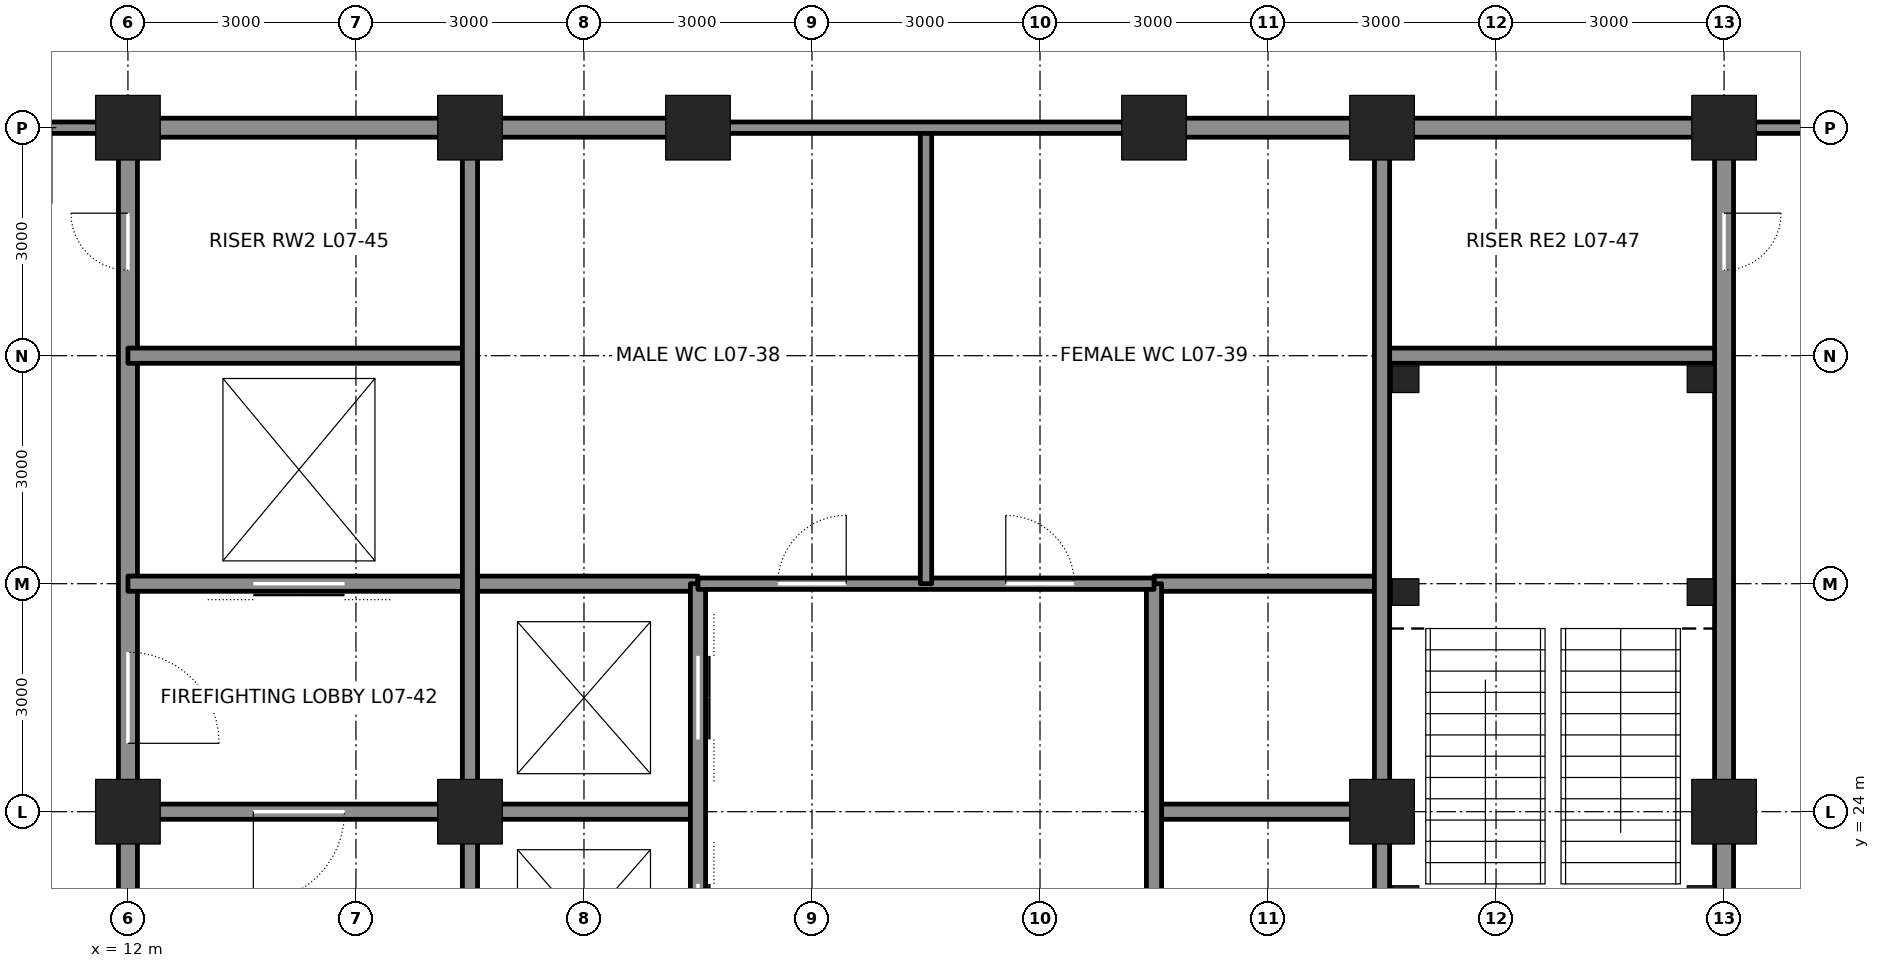
"""IFC4 building model, lengths in metres.
Left out: names, types, materials, properties, quantities, classifications, styles, units other than length and angle.
Written with IfcOpenShell. Run it as: python <this file> out.ifc"""

import sys

from ifc_helpers import new_model, si_unit, direction, frame, frame_2d, origin, origin_2d, place, context, subcontext, project, spatial, rectangle, hollow_rectangle, extrude, element, fill, save


model = new_model("IFC4")
c1 = context("Model", 3, precision=1e-05, world=origin(), true_north=direction((0.0, 1.0)))
c2 = subcontext(c1, "Body", "Model", "MODEL_VIEW")
j1 = project(units=[si_unit("LENGTHUNIT", "METRE"), si_unit("PLANEANGLEUNIT", "RADIAN")], contexts=[c1])
p1 = place(None, origin())
s1 = spatial("IfcSite", under=j1, at=p1, CompositionType="ELEMENT")
p2 = place(p1, origin())
s2 = spatial("IfcBuilding", under=s1, at=p2, CompositionType="ELEMENT")
p3 = place(p2, frame((0.0, 0.0, 37.8)))
s3 = spatial("IfcBuildingStorey", under=s2, at=p3, CompositionType="ELEMENT", Elevation=37.8)
for number, where, z_axis, x_axis in (
    (1, (12.0, 33.0, 0.0), (0.0, 0.0, 1.0), (1.0, 0.0, 0.0)),
    (2, (16.5, 33.0, 0.0), (0.0, 0.0, 1.0), (1.0, 0.0, 0.0)),
    (3, (19.5, 33.0, 0.0), (0.0, 0.0, 1.0), (1.0, 0.0, 0.0)),
    (4, (25.5, 33.0, 0.0), (0.0, 0.0, 1.0), (1.0, 0.0, 0.0)),
    (5, (28.5, 33.0, 0.0), (0.0, 0.0, 1.0), (1.0, 0.0, 0.0)),
    (6, (33.0, 33.0, 0.0), (0.0, 0.0, 1.0), (1.0, 0.0, 0.0)),
    (7, (12.0, 24.0, 0.0), (0.0, 0.0, 1.0), (1.0, 0.0, 0.0)),
    (8, (33.0, 24.0, 0.0), (0.0, 0.0, 1.0), (1.0, 0.0, 0.0)),
    (9, (16.5, 24.0, 0.0), (0.0, 0.0, 1.0), (1.0, 0.0, 0.0)),
    (10, (28.5, 24.0, 0.0), (0.0, 0.0, 1.0), (1.0, 0.0, 0.0)),
):
    element("IfcColumn", number, at=place(p3, frame(where, z_axis=z_axis, x_axis=x_axis)), inside=s3, PredefinedType="COLUMN", context=c2, shape_type="SweptSolid", body=[
        extrude(hollow_rectangle(XDim=0.85, YDim=0.85, WallThickness=0.085, at=origin_2d()), origin(), (0.0, 0.0, 1.0), 4.5),
    ])
p4 = place(p3, frame((12.0, 21.25, 0.0), z_axis=(0.0, 0.0, 1.0), x_axis=(0.0, 1.0, 0.0)))
e11 = element("IfcWall", 11, at=p4, inside=s3, PredefinedType="SOLIDWALL", context=c2, shape_type="SweptSolid", body=[
    extrude(rectangle(XDim=2.5, YDim=0.25, at=frame_2d((1.25, 0.0))), origin(), (0.0, 0.0, 1.0), 3.113),
])
p5 = place(p3, frame((12.0, 24.25, 0.0), z_axis=(0.0, 0.0, 1.0), x_axis=(0.0, 1.0, 0.0)))
e12 = element("IfcWall", 12, at=p5, inside=s3, PredefinedType="SOLIDWALL", context=c2, shape_type="SweptSolid", body=[
    extrude(rectangle(XDim=8.5, YDim=0.25, at=frame_2d((4.25, 0.0))), origin(), (0.0, 0.0, 1.0), 3.113),
])
p6 = place(p5, frame((0.65, 0.0, 0.0)))
e13 = element("IfcOpeningElement", 13, at=p6, cuts=e12, PredefinedType="OPENING", context=c2, shape_type="SweptSolid", body=[
    extrude(rectangle(XDim=1.2, YDim=2.1, at=frame_2d((0.6, 1.05))), frame((0.0, 0.135, 0.0), z_axis=(0.0, -1.0, 0.0), x_axis=(1.0, 0.0, 0.0)), (0.0, 0.0, 1.0), 0.27),
])
p7 = place(p5, frame((6.875, 0.0, 0.0)))
e14 = element("IfcOpeningElement", 14, at=p7, cuts=e12, PredefinedType="OPENING", context=c2, shape_type="SweptSolid", body=[
    extrude(rectangle(XDim=0.75, YDim=2.1, at=frame_2d((0.375, 1.05))), frame((0.0, 0.135, 0.0), z_axis=(0.0, -1.0, 0.0), x_axis=(1.0, 0.0, 0.0)), (0.0, 0.0, 1.0), 0.27),
])
p8 = place(p3, frame((12.25, 24.0, 0.0), z_axis=(0.0, 0.0, 1.0), x_axis=(1.0, 0.0, 0.0)))
e15 = element("IfcWall", 15, at=p8, inside=s3, PredefinedType="SOLIDWALL", context=c2, shape_type="SweptSolid", body=[
    extrude(rectangle(XDim=4.0, YDim=0.2, at=frame_2d((2.0, 0.0))), origin(), (0.0, 0.0, 1.0), 3.39),
])
p9 = place(p8, frame((1.4, 0.0, 0.0)))
e16 = element("IfcOpeningElement", 16, at=p9, cuts=e15, PredefinedType="OPENING", context=c2, shape_type="SweptSolid", body=[
    extrude(rectangle(XDim=1.2, YDim=2.1, at=frame_2d((0.6, 1.05))), frame((0.0, 0.11, 0.0), z_axis=(0.0, -1.0, 0.0), x_axis=(1.0, 0.0, 0.0)), (0.0, 0.0, 1.0), 0.22),
])
for number, where, z_axis, x_axis in (
    (17, (16.75, 24.0, 0.0), (0.0, 0.0, 1.0), (1.0, 0.0, 0.0)),
    (18, (25.5, 24.0, 0.0), (0.0, 0.0, 1.0), (1.0, 0.0, 0.0)),
):
    element("IfcWall", number, at=place(p3, frame(where, z_axis=z_axis, x_axis=x_axis)), inside=s3, PredefinedType="SOLIDWALL", context=c2, shape_type="SweptSolid", body=[
        extrude(rectangle(XDim=2.75, YDim=0.2, at=frame_2d((1.375, 0.0))), origin(), (0.0, 0.0, 1.0), 3.39),
    ])
p10 = place(p3, frame((12.0, 27.0, 0.0), z_axis=(0.0, 0.0, 1.0), x_axis=(1.0, 0.0, 0.0)))
e19 = element("IfcWall", 19, at=p10, inside=s3, PredefinedType="SOLIDWALL", context=c2, shape_type="SweptSolid", body=[
    extrude(rectangle(XDim=7.5, YDim=0.2, at=frame_2d((3.75, 0.0))), origin(), (0.0, 0.0, 1.0), 4.34),
])
p11 = place(p10, frame((1.65, 0.0, 0.0)))
e20 = element("IfcOpeningElement", 20, at=p11, cuts=e19, PredefinedType="OPENING", context=c2, shape_type="SweptSolid", body=[
    extrude(rectangle(XDim=1.2, YDim=2.1, at=frame_2d((0.6, 1.05))), frame((0.0, 0.11, 0.0), z_axis=(0.0, -1.0, 0.0), x_axis=(1.0, 0.0, 0.0)), (0.0, 0.0, 1.0), 0.22),
])
p12 = place(p3, frame((25.5, 27.0, 0.0), z_axis=(0.0, 0.0, 1.0), x_axis=(1.0, 0.0, 0.0)))
e21 = element("IfcWall", 21, at=p12, inside=s3, PredefinedType="SOLIDWALL", context=c2, shape_type="SweptSolid", body=[
    extrude(rectangle(XDim=3.0, YDim=0.2, at=frame_2d((1.5, 0.0))), origin(), (0.0, 0.0, 1.0), 4.34),
])
for number, where, z_axis, x_axis in (
    (22, (12.0, 30.0, 0.0), (0.0, 0.0, 1.0), (1.0, 0.0, 0.0)),
    (23, (28.5, 30.0, 0.0), (0.0, 0.0, 1.0), (1.0, 0.0, 0.0)),
):
    element("IfcWall", number, at=place(p3, frame(where, z_axis=z_axis, x_axis=x_axis)), inside=s3, PredefinedType="SOLIDWALL", context=c2, shape_type="SweptSolid", body=[
        extrude(rectangle(XDim=4.5, YDim=0.2, at=frame_2d((2.25, 0.0))), origin(), (0.0, 0.0, 1.0), 4.34),
    ])
p13 = place(p3, frame((12.25, 33.0, 0.0), z_axis=(0.0, 0.0, 1.0), x_axis=(1.0, 0.0, 0.0)))
e24 = element("IfcWall", 24, at=p13, inside=s3, PredefinedType="SOLIDWALL", context=c2, shape_type="SweptSolid", body=[
    extrude(rectangle(XDim=4.0, YDim=0.25, at=frame_2d((2.0, 0.0))), origin(), (0.0, 0.0, 1.0), 3.181),
])
for number, where, z_axis, x_axis in (
    (25, (16.75, 33.0, 0.0), (0.0, 0.0, 1.0), (1.0, 0.0, 0.0)),
    (26, (25.75, 33.0, 0.0), (0.0, 0.0, 1.0), (1.0, 0.0, 0.0)),
):
    element("IfcWall", number, at=place(p3, frame(where, z_axis=z_axis, x_axis=x_axis)), inside=s3, PredefinedType="SOLIDWALL", context=c2, shape_type="SweptSolid", body=[
        extrude(rectangle(XDim=2.5, YDim=0.25, at=frame_2d((1.25, 0.0))), origin(), (0.0, 0.0, 1.0), 3.181),
    ])
p14 = place(p3, frame((28.75, 33.0, 0.0), z_axis=(0.0, 0.0, 1.0), x_axis=(1.0, 0.0, 0.0)))
e27 = element("IfcWall", 27, at=p14, inside=s3, PredefinedType="SOLIDWALL", context=c2, shape_type="SweptSolid", body=[
    extrude(rectangle(XDim=4.0, YDim=0.25, at=frame_2d((2.0, 0.0))), origin(), (0.0, 0.0, 1.0), 3.181),
])
p15 = place(p3, frame((16.5, 21.25, 0.0), z_axis=(0.0, 0.0, 1.0), x_axis=(0.0, 1.0, 0.0)))
e28 = element("IfcWall", 28, at=p15, inside=s3, PredefinedType="SOLIDWALL", context=c2, shape_type="SweptSolid", body=[
    extrude(rectangle(XDim=2.5, YDim=0.2, at=frame_2d((1.25, 0.0))), origin(), (0.0, 0.0, 1.0), 3.413),
])
p16 = place(p3, frame((16.5, 24.25, 0.0), z_axis=(0.0, 0.0, 1.0), x_axis=(0.0, 1.0, 0.0)))
e29 = element("IfcWall", 29, at=p16, inside=s3, PredefinedType="SOLIDWALL", context=c2, shape_type="SweptSolid", body=[
    extrude(rectangle(XDim=8.5, YDim=0.2, at=frame_2d((4.25, 0.0))), origin(), (0.0, 0.0, 1.0), 3.413),
])
p17 = place(p3, frame((19.5, 15.0, 0.0), z_axis=(0.0, 0.0, 1.0), x_axis=(0.0, 1.0, 0.0)))
e30 = element("IfcWall", 30, at=p17, inside=s3, PredefinedType="SOLIDWALL", context=c2, shape_type="SweptSolid", body=[
    extrude(rectangle(XDim=12.0, YDim=0.2, at=frame_2d((6.0, 0.0))), origin(), (0.0, 0.0, 1.0), 3.365),
])
p18 = place(p17, frame((0.95, 0.0, 0.0)))
e31 = element("IfcOpeningElement", 31, at=p18, cuts=e30, PredefinedType="OPENING", context=c2, shape_type="SweptSolid", body=[
    extrude(rectangle(XDim=1.1, YDim=2.1, at=frame_2d((0.55, 1.05))), frame((0.0, 0.11, 0.0), z_axis=(0.0, -1.0, 0.0), x_axis=(1.0, 0.0, 0.0)), (0.0, 0.0, 1.0), 0.22),
])
p19 = place(p17, frame((3.95, 0.0, 0.0)))
e32 = element("IfcOpeningElement", 32, at=p19, cuts=e30, PredefinedType="OPENING", context=c2, shape_type="SweptSolid", body=[
    extrude(rectangle(XDim=1.1, YDim=2.1, at=frame_2d((0.55, 1.05))), frame((0.0, 0.11, 0.0), z_axis=(0.0, -1.0, 0.0), x_axis=(1.0, 0.0, 0.0)), (0.0, 0.0, 1.0), 0.22),
])
p20 = place(p17, frame((6.95, 0.0, 0.0)))
e33 = element("IfcOpeningElement", 33, at=p20, cuts=e30, PredefinedType="OPENING", context=c2, shape_type="SweptSolid", body=[
    extrude(rectangle(XDim=1.1, YDim=2.1, at=frame_2d((0.55, 1.05))), frame((0.0, 0.11, 0.0), z_axis=(0.0, -1.0, 0.0), x_axis=(1.0, 0.0, 0.0)), (0.0, 0.0, 1.0), 0.22),
])
p21 = place(p17, frame((9.95, 0.0, 0.0)))
e34 = element("IfcOpeningElement", 34, at=p21, cuts=e30, PredefinedType="OPENING", context=c2, shape_type="SweptSolid", body=[
    extrude(rectangle(XDim=1.1, YDim=2.1, at=frame_2d((0.55, 1.05))), frame((0.0, 0.11, 0.0), z_axis=(0.0, -1.0, 0.0), x_axis=(1.0, 0.0, 0.0)), (0.0, 0.0, 1.0), 0.22),
])
p22 = place(p3, frame((25.5, 15.0, 0.0), z_axis=(0.0, 0.0, 1.0), x_axis=(0.0, 1.0, 0.0)))
e35 = element("IfcWall", 35, at=p22, inside=s3, PredefinedType="SOLIDWALL", context=c2, shape_type="SweptSolid", body=[
    extrude(rectangle(XDim=12.0, YDim=0.2, at=frame_2d((6.0, 0.0))), origin(), (0.0, 0.0, 1.0), 3.365),
])
p23 = place(p3, frame((28.5, 21.25, 0.0), z_axis=(0.0, 0.0, 1.0), x_axis=(0.0, 1.0, 0.0)))
e36 = element("IfcWall", 36, at=p23, inside=s3, PredefinedType="SOLIDWALL", context=c2, shape_type="SweptSolid", body=[
    extrude(rectangle(XDim=2.5, YDim=0.2, at=frame_2d((1.25, 0.0))), origin(), (0.0, 0.0, 1.0), 3.413),
])
p24 = place(p3, frame((28.5, 24.25, 0.0), z_axis=(0.0, 0.0, 1.0), x_axis=(0.0, 1.0, 0.0)))
e37 = element("IfcWall", 37, at=p24, inside=s3, PredefinedType="SOLIDWALL", context=c2, shape_type="SweptSolid", body=[
    extrude(rectangle(XDim=8.5, YDim=0.2, at=frame_2d((4.25, 0.0))), origin(), (0.0, 0.0, 1.0), 3.413),
])
p25 = place(p3, frame((33.0, 21.25, 0.0), z_axis=(0.0, 0.0, 1.0), x_axis=(0.0, 1.0, 0.0)))
e38 = element("IfcWall", 38, at=p25, inside=s3, PredefinedType="SOLIDWALL", context=c2, shape_type="SweptSolid", body=[
    extrude(rectangle(XDim=2.5, YDim=0.25, at=frame_2d((1.25, 0.0))), origin(), (0.0, 0.0, 1.0), 3.113),
])
p26 = place(p3, frame((33.0, 24.25, 0.0), z_axis=(0.0, 0.0, 1.0), x_axis=(0.0, 1.0, 0.0)))
e39 = element("IfcWall", 39, at=p26, inside=s3, PredefinedType="SOLIDWALL", context=c2, shape_type="SweptSolid", body=[
    extrude(rectangle(XDim=8.5, YDim=0.25, at=frame_2d((4.25, 0.0))), origin(), (0.0, 0.0, 1.0), 3.113),
])
p27 = place(p26, frame((6.875, 0.0, 0.0)))
e40 = element("IfcOpeningElement", 40, at=p27, cuts=e39, PredefinedType="OPENING", context=c2, shape_type="SweptSolid", body=[
    extrude(rectangle(XDim=0.75, YDim=2.1, at=frame_2d((0.375, 1.05))), frame((0.0, 0.135, 0.0), z_axis=(0.0, -1.0, 0.0), x_axis=(1.0, 0.0, 0.0)), (0.0, 0.0, 1.0), 0.27),
])
p28 = place(p3, frame((19.5, 27.0, 0.0), z_axis=(0.0, 0.0, 1.0), x_axis=(1.0, 0.0, 0.0)))
e41 = element("IfcWall", 41, at=p28, inside=s3, PredefinedType="PARTITIONING", context=c2, shape_type="SweptSolid", body=[
    extrude(rectangle(XDim=6.0, YDim=0.15, at=frame_2d((3.0, 0.0))), origin(), (0.0, 0.0, 1.0), 4.34),
])
p29 = place(p28, frame((1.05, 0.0, 0.0)))
e42 = element("IfcOpeningElement", 42, at=p29, cuts=e41, PredefinedType="OPENING", context=c2, shape_type="SweptSolid", body=[
    extrude(rectangle(XDim=0.9, YDim=2.1, at=frame_2d((0.45, 1.05))), frame((0.0, 0.085, 0.0), z_axis=(0.0, -1.0, 0.0), x_axis=(1.0, 0.0, 0.0)), (0.0, 0.0, 1.0), 0.17),
])
p30 = place(p28, frame((4.05, 0.0, 0.0)))
e43 = element("IfcOpeningElement", 43, at=p30, cuts=e41, PredefinedType="OPENING", context=c2, shape_type="SweptSolid", body=[
    extrude(rectangle(XDim=0.9, YDim=2.1, at=frame_2d((0.45, 1.05))), frame((0.0, 0.085, 0.0), z_axis=(0.0, -1.0, 0.0), x_axis=(1.0, 0.0, 0.0)), (0.0, 0.0, 1.0), 0.17),
])
p31 = place(p3, frame((22.5, 27.0, 0.0), z_axis=(0.0, 0.0, 1.0), x_axis=(0.0, 1.0, 0.0)))
e44 = element("IfcWall", 44, at=p31, inside=s3, PredefinedType="PARTITIONING", context=c2, shape_type="SweptSolid", body=[
    extrude(rectangle(XDim=6.0, YDim=0.15, at=frame_2d((3.0, 0.0))), origin(), (0.0, 0.0, 1.0), 4.34),
])
p32 = place(p3, frame((19.5, 33.0, 0.0), z_axis=(0.0, 0.0, 1.0), x_axis=(1.0, 0.0, 0.0)))
e45 = element("IfcWall", 45, at=p32, inside=s3, PredefinedType="PARTITIONING", context=c2, shape_type="SweptSolid", body=[
    extrude(rectangle(XDim=6.0, YDim=0.15, at=frame_2d((3.0, 0.0))), origin(), (0.0, 0.0, 1.0), 3.181),
])
p33 = place(p3, frame((9.0, 33.0, -0.3), z_axis=(0.0, 0.0, 1.0), x_axis=(1.0, 0.0, 0.0)))
e46 = element("IfcWall", 46, at=p33, inside=s3, PredefinedType="PARTITIONING", context=c2, shape_type="SweptSolid", body=[
    extrude(rectangle(XDim=3.0, YDim=0.15, at=frame_2d((1.5, 0.0))), origin(), (0.0, 0.0, 1.0), 3.481),
])
p34 = place(p33, frame((1.0, 0.0, 0.3)))
e47 = element("IfcOpeningElement", 47, at=p34, cuts=e46, PredefinedType="OPENING", context=c2, shape_type="SweptSolid", body=[
    extrude(rectangle(XDim=1.0, YDim=2.4, at=frame_2d((0.5, 1.2))), frame((0.0, 0.085, 0.0), z_axis=(0.0, -1.0, 0.0), x_axis=(1.0, 0.0, 0.0)), (0.0, 0.0, 1.0), 0.17),
])
p35 = place(p3, frame((33.0, 33.0, -0.3), z_axis=(0.0, 0.0, 1.0), x_axis=(1.0, 0.0, 0.0)))
e48 = element("IfcWall", 48, at=p35, inside=s3, PredefinedType="PARTITIONING", context=c2, shape_type="SweptSolid", body=[
    extrude(rectangle(XDim=1.8, YDim=0.15, at=frame_2d((0.9, 0.0))), origin(), (0.0, 0.0, 1.0), 3.481),
])
for number, where, z_axis, x_axis in (
    (49, (28.81, 29.69, 0.0), (0.0, 0.0, 1.0), (1.0, 0.0, 0.0)),
    (50, (32.69, 29.69, 0.0), (0.0, 0.0, 1.0), (1.0, 0.0, 0.0)),
    (51, (28.81, 26.89, 0.0), (0.0, 0.0, 1.0), (1.0, 0.0, 0.0)),
    (52, (32.69, 26.89, 0.0), (0.0, 0.0, 1.0), (1.0, 0.0, 0.0)),
    (53, (28.81, 22.85, 0.0), (0.0, 0.0, 1.0), (1.0, 0.0, 0.0)),
    (54, (32.69, 22.85, 0.0), (0.0, 0.0, 1.0), (1.0, 0.0, 0.0)),
):
    element("IfcColumn", number, at=place(p3, frame(where, z_axis=z_axis, x_axis=x_axis)), inside=s3, PredefinedType="COLUMN", context=c2, shape_type="SweptSolid", body=[
        extrude(hollow_rectangle(XDim=0.35, YDim=0.35, WallThickness=0.035, at=origin_2d()), origin(), (0.0, 0.0, 1.0), 4.5),
    ])
p36 = place(p9, frame((1.2, 0.0, 0.0), z_axis=(0.0, 0.0, 1.0), x_axis=(-1.0, 0.0, 0.0)))
e55 = element("IfcDoor", 55, at=p36, inside=s3, OperationType="SINGLE_SWING_RIGHT", PredefinedType="DOOR", context=c2, shape_type="SweptSolid", body=[
    extrude(rectangle(XDim=1.2, YDim=2.1, at=frame_2d((0.6, 1.05))), frame((0.0, 0.025, 0.0), z_axis=(0.0, -1.0, 0.0), x_axis=(1.0, 0.0, 0.0)), (0.0, 0.0, 1.0), 0.05),
])
fill(e16, e55)
p37 = place(p6, frame((1.2, 0.0, 0.0), z_axis=(0.0, 0.0, 1.0), x_axis=(-1.0, 0.0, 0.0)))
e56 = element("IfcDoor", 56, at=p37, inside=s3, OperationType="SINGLE_SWING_RIGHT", PredefinedType="DOOR", context=c2, shape_type="SweptSolid", body=[
    extrude(rectangle(XDim=1.2, YDim=2.1, at=frame_2d((0.6, 1.05))), frame((0.0, 0.025, 0.0), z_axis=(0.0, -1.0, 0.0), x_axis=(1.0, 0.0, 0.0)), (0.0, 0.0, 1.0), 0.05),
])
fill(e13, e56)
p38 = place(p11, origin())
e57 = element("IfcDoor", 57, at=p38, inside=s3, OperationType="DOUBLE_DOOR_SLIDING", PredefinedType="DOOR", context=c2, shape_type="SweptSolid", body=[
    extrude(rectangle(XDim=1.2, YDim=2.1, at=frame_2d((0.6, 1.05))), frame((0.0, 0.025, 0.0), z_axis=(0.0, -1.0, 0.0), x_axis=(1.0, 0.0, 0.0)), (0.0, 0.0, 1.0), 0.05),
])
fill(e20, e57)
p39 = place(p7, origin())
e58 = element("IfcDoor", 58, at=p39, inside=s3, OperationType="SINGLE_SWING_RIGHT", PredefinedType="DOOR", context=c2, shape_type="SweptSolid", body=[
    extrude(rectangle(XDim=0.75, YDim=2.1, at=frame_2d((0.375, 1.05))), frame((0.0, 0.025, 0.0), z_axis=(0.0, -1.0, 0.0), x_axis=(1.0, 0.0, 0.0)), (0.0, 0.0, 1.0), 0.05),
])
fill(e14, e58)
p40 = place(p27, frame((0.75, 0.0, 0.0), z_axis=(0.0, 0.0, 1.0), x_axis=(-1.0, 0.0, 0.0)))
e59 = element("IfcDoor", 59, at=p40, inside=s3, OperationType="SINGLE_SWING_LEFT", PredefinedType="DOOR", context=c2, shape_type="SweptSolid", body=[
    extrude(rectangle(XDim=0.75, YDim=2.1, at=frame_2d((0.375, 1.05))), frame((0.0, 0.025, 0.0), z_axis=(0.0, -1.0, 0.0), x_axis=(1.0, 0.0, 0.0)), (0.0, 0.0, 1.0), 0.05),
])
fill(e40, e59)
p41 = place(p29, origin())
e60 = element("IfcDoor", 60, at=p41, inside=s3, OperationType="SINGLE_SWING_RIGHT", PredefinedType="DOOR", context=c2, shape_type="SweptSolid", body=[
    extrude(rectangle(XDim=0.9, YDim=2.1, at=frame_2d((0.45, 1.05))), frame((0.0, 0.025, 0.0), z_axis=(0.0, -1.0, 0.0), x_axis=(1.0, 0.0, 0.0)), (0.0, 0.0, 1.0), 0.05),
])
fill(e42, e60)
p42 = place(p30, origin())
e61 = element("IfcDoor", 61, at=p42, inside=s3, OperationType="SINGLE_SWING_LEFT", PredefinedType="DOOR", context=c2, shape_type="SweptSolid", body=[
    extrude(rectangle(XDim=0.9, YDim=2.1, at=frame_2d((0.45, 1.05))), frame((0.0, 0.025, 0.0), z_axis=(0.0, -1.0, 0.0), x_axis=(1.0, 0.0, 0.0)), (0.0, 0.0, 1.0), 0.05),
])
fill(e43, e61)
p43 = place(p20, origin())
e62 = element("IfcDoor", 62, at=p43, inside=s3, OperationType="DOUBLE_DOOR_SLIDING", PredefinedType="DOOR", context=c2, shape_type="SweptSolid", body=[
    extrude(rectangle(XDim=1.1, YDim=2.1, at=frame_2d((0.55, 1.05))), frame((0.0, 0.025, 0.0), z_axis=(0.0, -1.0, 0.0), x_axis=(1.0, 0.0, 0.0)), (0.0, 0.0, 1.0), 0.05),
])
fill(e33, e62)
p44 = place(p21, origin())
e63 = element("IfcDoor", 63, at=p44, inside=s3, OperationType="DOUBLE_DOOR_SLIDING", PredefinedType="DOOR", context=c2, shape_type="SweptSolid", body=[
    extrude(rectangle(XDim=1.1, YDim=2.1, at=frame_2d((0.55, 1.05))), frame((0.0, 0.025, 0.0), z_axis=(0.0, -1.0, 0.0), x_axis=(1.0, 0.0, 0.0)), (0.0, 0.0, 1.0), 0.05),
])
fill(e34, e63)
save(model, sys.argv[1])
